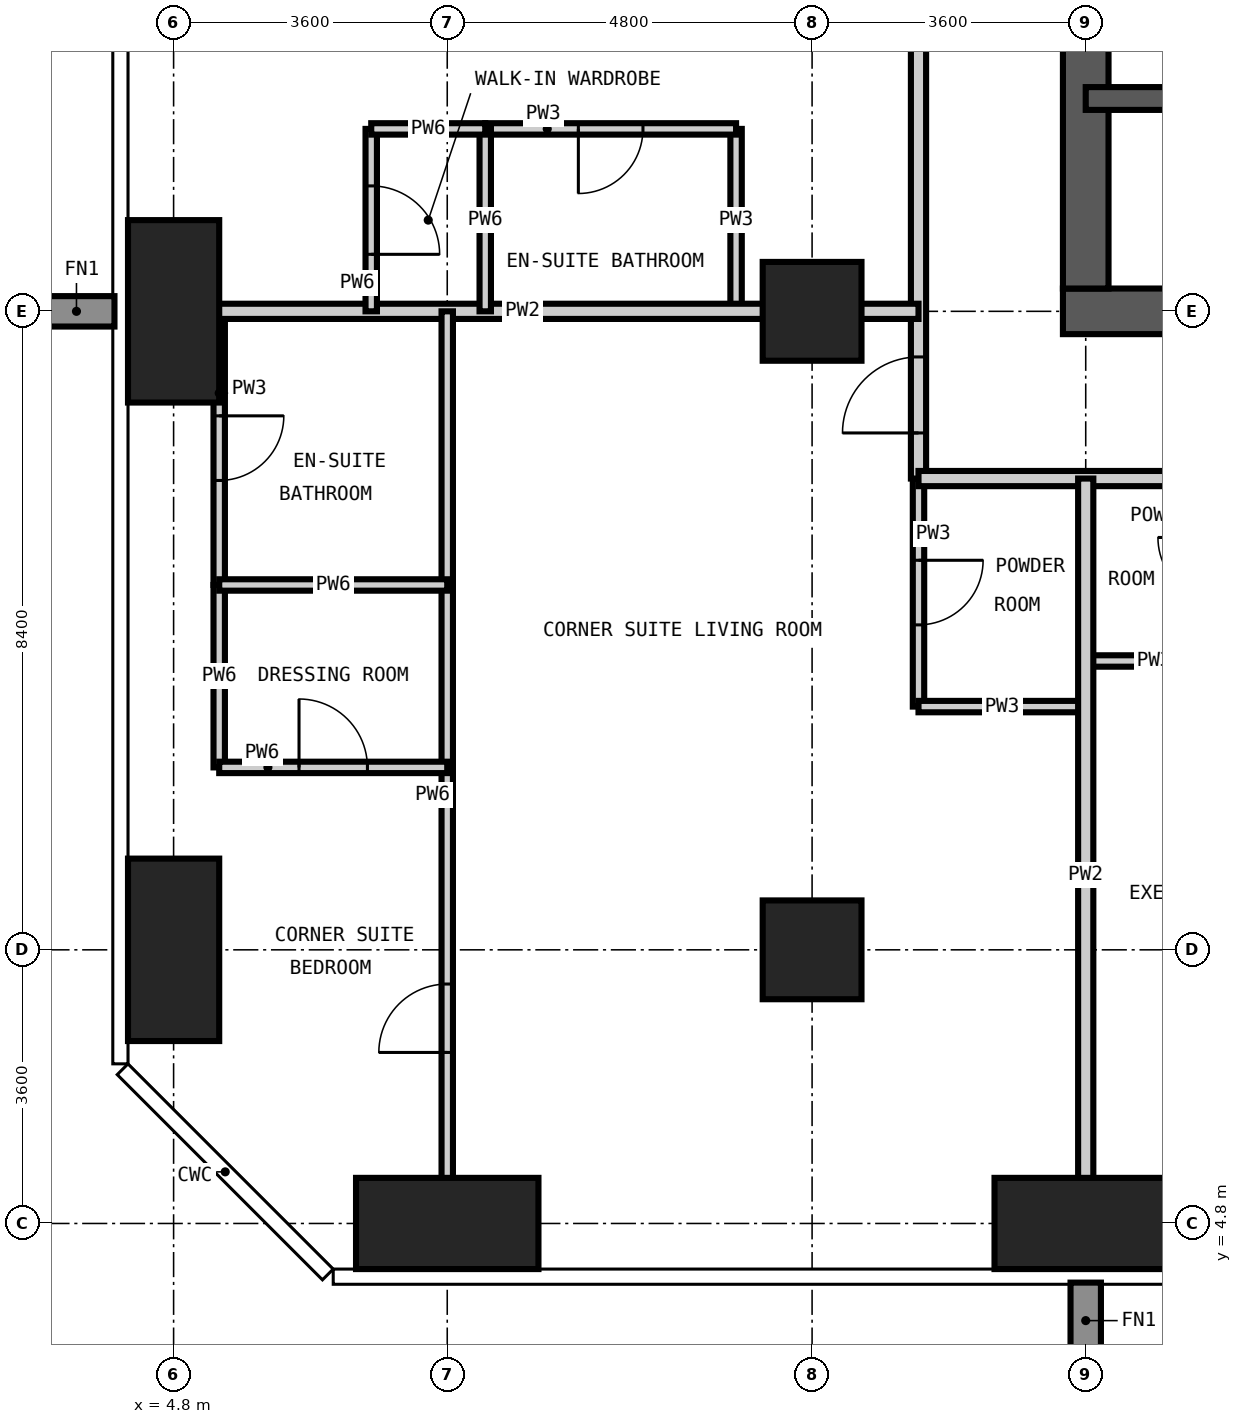
"""IFC4 building model, lengths in metres.
Left out: names, types, materials, properties, quantities, classifications, styles, units other than length and angle.
Written with IfcOpenShell. Run it as: python <this file> out.ifc"""

import sys

from ifc_helpers import new_model, si_unit, direction, frame, frame_2d, origin, origin_2d, place, context, subcontext, project, spatial, rectangle, extrude, element, fill, save


model = new_model("IFC4")
c1 = context("Model", 3, precision=1e-05, world=origin(), true_north=direction((0.0, 1.0)))
c2 = subcontext(c1, "Body", "Model", "MODEL_VIEW")
j1 = project(units=[si_unit("LENGTHUNIT", "METRE"), si_unit("PLANEANGLEUNIT", "RADIAN")], contexts=[c1])
p1 = place(None, origin())
s1 = spatial("IfcSite", under=j1, at=p1, CompositionType="ELEMENT")
p2 = place(p1, origin())
s2 = spatial("IfcBuilding", under=s1, at=p2, CompositionType="ELEMENT")
p3 = place(p2, frame((0.0, 0.0, 180.6)))
s3 = spatial("IfcBuildingStorey", under=s2, at=p3, CompositionType="ELEMENT", Elevation=180.6)
for number, where, z_axis, x_axis in (
    (1, (4.8, 8.4, -0.35), (0.0, 0.0, 1.0), (1.0, 0.0, 0.0)),
    (2, (4.8, 16.8, -0.35), (0.0, 0.0, 1.0), (1.0, 0.0, 0.0)),
):
    element("IfcColumn", number, at=place(p3, frame(where, z_axis=z_axis, x_axis=x_axis)), inside=s3, PredefinedType="COLUMN", context=c2, shape_type="SweptSolid", body=[
        extrude(rectangle(XDim=1.2, YDim=2.4, at=origin_2d()), origin(), (0.0, 0.0, 1.0), 3.6),
    ])
p4 = place(p3, frame((8.4, 4.8, -0.35), z_axis=(0.0, 0.0, 1.0), x_axis=(1.0, 0.0, 0.0)))
e3 = element("IfcColumn", 3, at=p4, inside=s3, PredefinedType="COLUMN", context=c2, shape_type="SweptSolid", body=[
    extrude(rectangle(XDim=2.4, YDim=1.2, at=origin_2d()), origin(), (0.0, 0.0, 1.0), 3.6),
])
for number, where, z_axis, x_axis in (
    (4, (13.2, 8.4, -0.35), (0.0, 0.0, 1.0), (1.0, 0.0, 0.0)),
    (5, (13.2, 16.8, -0.35), (0.0, 0.0, 1.0), (1.0, 0.0, 0.0)),
):
    element("IfcColumn", number, at=place(p3, frame(where, z_axis=z_axis, x_axis=x_axis)), inside=s3, PredefinedType="COLUMN", context=c2, shape_type="SweptSolid", body=[
        extrude(rectangle(XDim=1.3, YDim=1.3, at=origin_2d()), origin(), (0.0, 0.0, 1.0), 3.6),
    ])
p5 = place(p3, frame((16.8, 4.8, -0.35), z_axis=(0.0, 0.0, 1.0), x_axis=(1.0, 0.0, 0.0)))
e6 = element("IfcColumn", 6, at=p5, inside=s3, PredefinedType="COLUMN", context=c2, shape_type="SweptSolid", body=[
    extrude(rectangle(XDim=2.4, YDim=1.2, at=origin_2d()), origin(), (0.0, 0.0, 1.0), 3.6),
])
p6 = place(p3, frame((16.5, 16.8, -0.35), z_axis=(0.0, 0.0, 1.0), x_axis=(1.0, 0.0, 0.0)))
e7 = element("IfcWall", 7, at=p6, inside=s3, PredefinedType="SHEAR", context=c2, shape_type="SweptSolid", body=[
    extrude(rectangle(XDim=25.8, YDim=0.6, at=frame_2d((12.9, 0.0))), origin(), (0.0, 0.0, 1.0), 3.6),
])
p7 = place(p6, frame((12.4, 0.0, 0.35)))
e8 = element("IfcOpeningElement", 8, at=p7, cuts=e7, PredefinedType="OPENING", context=c2, shape_type="SweptSolid", body=[
    extrude(rectangle(XDim=1.0, YDim=2.1, at=frame_2d((0.5, 1.05))), frame((0.0, 0.31, 0.0), z_axis=(0.0, -1.0, 0.0), x_axis=(1.0, 0.0, 0.0)), (0.0, 0.0, 1.0), 0.62),
])
p8 = place(p6, frame((18.7, 0.0, 0.35)))
e9 = element("IfcOpeningElement", 9, at=p8, cuts=e7, PredefinedType="OPENING", context=c2, shape_type="SweptSolid", body=[
    extrude(rectangle(XDim=1.0, YDim=2.1, at=frame_2d((0.5, 1.05))), frame((0.0, 0.31, 0.0), z_axis=(0.0, -1.0, 0.0), x_axis=(1.0, 0.0, 0.0)), (0.0, 0.0, 1.0), 0.62),
])
p9 = place(p3, frame((16.8, 41.7, -0.35), z_axis=(0.0, 0.0, 1.0), x_axis=(0.0, -1.0, 0.0)))
e10 = element("IfcWall", 10, at=p9, inside=s3, PredefinedType="SHEAR", context=c2, shape_type="SweptSolid", body=[
    extrude(rectangle(XDim=24.6, YDim=0.6, at=frame_2d((12.3, 0.0))), origin(), (0.0, 0.0, 1.0), 3.6),
])
p10 = place(p9, frame((11.4, 0.0, 0.35)))
e11 = element("IfcOpeningElement", 11, at=p10, cuts=e10, PredefinedType="OPENING", context=c2, shape_type="SweptSolid", body=[
    extrude(rectangle(XDim=1.8, YDim=2.2, at=frame_2d((0.9, 1.1))), frame((0.0, 0.31, 0.0), z_axis=(0.0, -1.0, 0.0), x_axis=(1.0, 0.0, 0.0)), (0.0, 0.0, 1.0), 0.62),
])
p11 = place(p9, frame((20.2, 0.0, 0.35)))
e12 = element("IfcOpeningElement", 12, at=p11, cuts=e10, PredefinedType="OPENING", context=c2, shape_type="SweptSolid", body=[
    extrude(rectangle(XDim=1.0, YDim=2.1, at=frame_2d((0.5, 1.05))), frame((0.0, 0.31, 0.0), z_axis=(0.0, -1.0, 0.0), x_axis=(1.0, 0.0, 0.0)), (0.0, 0.0, 1.0), 0.62),
])
p12 = place(p9, frame((5.5, 0.0, 0.35)))
e13 = element("IfcOpeningElement", 13, at=p12, cuts=e10, PredefinedType="OPENING", context=c2, shape_type="SweptSolid", body=[
    extrude(rectangle(XDim=1.0, YDim=2.1, at=frame_2d((0.5, 1.05))), frame((0.0, 0.31, 0.0), z_axis=(0.0, -1.0, 0.0), x_axis=(1.0, 0.0, 0.0)), (0.0, 0.0, 1.0), 0.62),
])
p13 = place(p3, frame((16.8, 19.6, -0.35), z_axis=(0.0, 0.0, 1.0), x_axis=(1.0, 0.0, 0.0)))
e14 = element("IfcWall", 14, at=p13, inside=s3, PredefinedType="SHEAR", context=c2, shape_type="SweptSolid", body=[
    extrude(rectangle(XDim=8.4, YDim=0.3, at=frame_2d((4.2, 0.0))), origin(), (0.0, 0.0, 1.0), 3.6),
])
p14 = place(p13, frame((1.6, 0.0, 0.35)))
e15 = element("IfcOpeningElement", 15, at=p14, cuts=e14, PredefinedType="OPENING", context=c2, shape_type="SweptSolid", body=[
    extrude(rectangle(XDim=1.0, YDim=2.1, at=frame_2d((0.5, 1.05))), frame((0.0, 0.16, 0.0), z_axis=(0.0, -1.0, 0.0), x_axis=(1.0, 0.0, 0.0)), (0.0, 0.0, 1.0), 0.32),
])
p15 = place(p13, frame((5.8, 0.0, 0.35)))
e16 = element("IfcOpeningElement", 16, at=p15, cuts=e14, PredefinedType="OPENING", context=c2, shape_type="SweptSolid", body=[
    extrude(rectangle(XDim=1.0, YDim=2.1, at=frame_2d((0.5, 1.05))), frame((0.0, 0.16, 0.0), z_axis=(0.0, -1.0, 0.0), x_axis=(1.0, 0.0, 0.0)), (0.0, 0.0, 1.0), 0.32),
])
p16 = place(p3, frame((5.4, 13.2, 0.0), z_axis=(0.0, 0.0, 1.0), x_axis=(0.0, 1.0, 0.0)))
e17 = element("IfcWall", 17, at=p16, inside=s3, PredefinedType="PARTITIONING", context=c2, shape_type="SweptSolid", body=[
    extrude(rectangle(XDim=3.6, YDim=0.15, at=frame_2d((1.8, 0.0))), origin(), (0.0, 0.0, 1.0), 3.25),
])
p17 = place(p16, frame((1.375, 0.0, 0.0)))
e18 = element("IfcOpeningElement", 18, at=p17, cuts=e17, PredefinedType="OPENING", context=c2, shape_type="SweptSolid", body=[
    extrude(rectangle(XDim=0.85, YDim=2.1, at=frame_2d((0.425, 1.05))), frame((0.0, 0.085, 0.0), z_axis=(0.0, -1.0, 0.0), x_axis=(1.0, 0.0, 0.0)), (0.0, 0.0, 1.0), 0.17),
])
p18 = place(p3, frame((12.2, 16.8, 0.0), z_axis=(0.0, 0.0, 1.0), x_axis=(0.0, 1.0, 0.0)))
e19 = element("IfcWall", 19, at=p18, inside=s3, PredefinedType="PARTITIONING", context=c2, shape_type="SweptSolid", body=[
    extrude(rectangle(XDim=2.4, YDim=0.15, at=frame_2d((1.2, 0.0))), origin(), (0.0, 0.0, 1.0), 3.25),
])
p19 = place(p3, frame((14.6, 11.6, 0.0), z_axis=(0.0, 0.0, 1.0), x_axis=(0.0, 1.0, 0.0)))
e20 = element("IfcWall", 20, at=p19, inside=s3, PredefinedType="PARTITIONING", context=c2, shape_type="SweptSolid", body=[
    extrude(rectangle(XDim=3.0, YDim=0.15, at=frame_2d((1.5, 0.0))), origin(), (0.0, 0.0, 1.0), 3.25),
])
p20 = place(p19, frame((1.075, 0.0, 0.0)))
e21 = element("IfcOpeningElement", 21, at=p20, cuts=e20, PredefinedType="OPENING", context=c2, shape_type="SweptSolid", body=[
    extrude(rectangle(XDim=0.85, YDim=2.1, at=frame_2d((0.425, 1.05))), frame((0.0, 0.085, 0.0), z_axis=(0.0, -1.0, 0.0), x_axis=(1.0, 0.0, 0.0)), (0.0, 0.0, 1.0), 0.17),
])
p21 = place(p3, frame((14.6, 11.6, 0.0), z_axis=(0.0, 0.0, 1.0), x_axis=(1.0, 0.0, 0.0)))
e22 = element("IfcWall", 22, at=p21, inside=s3, PredefinedType="PARTITIONING", context=c2, shape_type="SweptSolid", body=[
    extrude(rectangle(XDim=2.2, YDim=0.15, at=frame_2d((1.1, 0.0))), origin(), (0.0, 0.0, 1.0), 3.25),
])
p22 = place(p3, frame((16.8, 12.2, 0.0), z_axis=(0.0, 0.0, 1.0), x_axis=(1.0, 0.0, 0.0)))
e23 = element("IfcWall", 23, at=p22, inside=s3, PredefinedType="PARTITIONING", context=c2, shape_type="SweptSolid", body=[
    extrude(rectangle(XDim=1.8, YDim=0.15, at=frame_2d((0.9, 0.0))), origin(), (0.0, 0.0, 1.0), 3.25),
])
p23 = place(p3, frame((8.9, 19.2, 0.0), z_axis=(0.0, 0.0, 1.0), x_axis=(1.0, 0.0, 0.0)))
e24 = element("IfcWall", 24, at=p23, inside=s3, PredefinedType="PARTITIONING", context=c2, shape_type="SweptSolid", body=[
    extrude(rectangle(XDim=3.3, YDim=0.15, at=frame_2d((1.65, 0.0))), origin(), (0.0, 0.0, 1.0), 3.25),
])
p24 = place(p23, frame((1.225, 0.0, 0.0)))
e25 = element("IfcOpeningElement", 25, at=p24, cuts=e24, PredefinedType="OPENING", context=c2, shape_type="SweptSolid", body=[
    extrude(rectangle(XDim=0.85, YDim=2.1, at=frame_2d((0.425, 1.05))), frame((0.0, 0.085, 0.0), z_axis=(0.0, -1.0, 0.0), x_axis=(1.0, 0.0, 0.0)), (0.0, 0.0, 1.0), 0.17),
])
p25 = place(p3, frame((14.6, 14.6, 0.0), z_axis=(0.0, 0.0, 1.0), x_axis=(0.0, 1.0, 0.0)))
e26 = element("IfcWall", 26, at=p25, inside=s3, PredefinedType="PARTITIONING", context=c2, shape_type="SweptSolid", body=[
    extrude(rectangle(XDim=30.8, YDim=0.2, at=frame_2d((15.4, 0.0))), origin(), (0.0, 0.0, 1.0), 3.25),
])
p26 = place(p25, frame((5.9, 0.0, 0.0)))
e27 = element("IfcOpeningElement", 27, at=p26, cuts=e26, PredefinedType="OPENING", context=c2, shape_type="SweptSolid", body=[
    extrude(rectangle(XDim=1.0, YDim=2.2, at=frame_2d((0.5, 1.1))), frame((0.0, 0.11, 0.0), z_axis=(0.0, -1.0, 0.0), x_axis=(1.0, 0.0, 0.0)), (0.0, 0.0, 1.0), 0.22),
])
p27 = place(p25, frame((11.8, 0.0, 0.0)))
e28 = element("IfcOpeningElement", 28, at=p27, cuts=e26, PredefinedType="OPENING", context=c2, shape_type="SweptSolid", body=[
    extrude(rectangle(XDim=1.8, YDim=2.4, at=frame_2d((0.9, 1.2))), frame((0.0, 0.11, 0.0), z_axis=(0.0, -1.0, 0.0), x_axis=(1.0, 0.0, 0.0)), (0.0, 0.0, 1.0), 0.22),
])
p28 = place(p25, frame((19.425, 0.0, 0.0)))
e29 = element("IfcOpeningElement", 29, at=p28, cuts=e26, PredefinedType="OPENING", context=c2, shape_type="SweptSolid", body=[
    extrude(rectangle(XDim=1.0, YDim=2.2, at=frame_2d((0.5, 1.1))), frame((0.0, 0.11, 0.0), z_axis=(0.0, -1.0, 0.0), x_axis=(1.0, 0.0, 0.0)), (0.0, 0.0, 1.0), 0.22),
])
p29 = place(p25, frame((24.8, 0.0, 0.0)))
e30 = element("IfcOpeningElement", 30, at=p29, cuts=e26, PredefinedType="OPENING", context=c2, shape_type="SweptSolid", body=[
    extrude(rectangle(XDim=1.0, YDim=2.2, at=frame_2d((0.5, 1.1))), frame((0.0, 0.11, 0.0), z_axis=(0.0, -1.0, 0.0), x_axis=(1.0, 0.0, 0.0)), (0.0, 0.0, 1.0), 0.22),
])
p30 = place(p25, frame((0.6, 0.0, 0.0)))
e31 = element("IfcOpeningElement", 31, at=p30, cuts=e26, PredefinedType="OPENING", context=c2, shape_type="SweptSolid", body=[
    extrude(rectangle(XDim=1.0, YDim=2.2, at=frame_2d((0.5, 1.1))), frame((0.0, 0.11, 0.0), z_axis=(0.0, -1.0, 0.0), x_axis=(1.0, 0.0, 0.0)), (0.0, 0.0, 1.0), 0.22),
])
p31 = place(p25, frame((28.6, 0.0, 0.0)))
e32 = element("IfcOpeningElement", 32, at=p31, cuts=e26, PredefinedType="OPENING", context=c2, shape_type="SweptSolid", body=[
    extrude(rectangle(XDim=1.0, YDim=2.2, at=frame_2d((0.5, 1.1))), frame((0.0, 0.11, 0.0), z_axis=(0.0, -1.0, 0.0), x_axis=(1.0, 0.0, 0.0)), (0.0, 0.0, 1.0), 0.22),
])
p32 = place(p3, frame((44.8, 14.6, 0.0), z_axis=(0.0, 0.0, 1.0), x_axis=(-1.0, 0.0, 0.0)))
e33 = element("IfcWall", 33, at=p32, inside=s3, PredefinedType="PARTITIONING", context=c2, shape_type="SweptSolid", body=[
    extrude(rectangle(XDim=30.2, YDim=0.2, at=frame_2d((15.1, 0.0))), origin(), (0.0, 0.0, 1.0), 3.25),
])
p33 = place(p32, frame((24.5, 0.0, 0.0)))
e34 = element("IfcOpeningElement", 34, at=p33, cuts=e33, PredefinedType="OPENING", context=c2, shape_type="SweptSolid", body=[
    extrude(rectangle(XDim=1.0, YDim=2.2, at=frame_2d((0.5, 1.1))), frame((0.0, 0.11, 0.0), z_axis=(0.0, -1.0, 0.0), x_axis=(1.0, 0.0, 0.0)), (0.0, 0.0, 1.0), 0.22),
])
p34 = place(p32, frame((13.7, 0.0, 0.0)))
e35 = element("IfcOpeningElement", 35, at=p34, cuts=e33, PredefinedType="OPENING", context=c2, shape_type="SweptSolid", body=[
    extrude(rectangle(XDim=1.0, YDim=2.2, at=frame_2d((0.5, 1.1))), frame((0.0, 0.11, 0.0), z_axis=(0.0, -1.0, 0.0), x_axis=(1.0, 0.0, 0.0)), (0.0, 0.0, 1.0), 0.22),
])
p35 = place(p32, frame((7.7, 0.0, 0.0)))
e36 = element("IfcOpeningElement", 36, at=p35, cuts=e33, PredefinedType="OPENING", context=c2, shape_type="SweptSolid", body=[
    extrude(rectangle(XDim=1.0, YDim=2.2, at=frame_2d((0.5, 1.1))), frame((0.0, 0.11, 0.0), z_axis=(0.0, -1.0, 0.0), x_axis=(1.0, 0.0, 0.0)), (0.0, 0.0, 1.0), 0.22),
])
for number, where, z_axis, x_axis in (
    (37, (16.8, 4.182, 0.0), (0.0, 0.0, 1.0), (0.0, 1.0, 0.0)),
    (38, (4.182, 16.8, 0.0), (0.0, 0.0, 1.0), (1.0, 0.0, 0.0)),
):
    element("IfcWall", number, at=place(p3, frame(where, z_axis=z_axis, x_axis=x_axis)), inside=s3, PredefinedType="PARTITIONING", context=c2, shape_type="SweptSolid", body=[
        extrude(rectangle(XDim=10.418, YDim=0.2, at=frame_2d((5.209, 0.0))), origin(), (0.0, 0.0, 1.0), 3.25),
    ])
p36 = place(p3, frame((5.4, 10.8, 0.0), z_axis=(0.0, 0.0, 1.0), x_axis=(0.0, 1.0, 0.0)))
e39 = element("IfcWall", 39, at=p36, inside=s3, PredefinedType="PARTITIONING", context=c2, shape_type="SweptSolid", body=[
    extrude(rectangle(XDim=2.4, YDim=0.15, at=frame_2d((1.2, 0.0))), origin(), (0.0, 0.0, 1.0), 3.25),
])
p37 = place(p3, frame((7.4, 16.8, 0.0), z_axis=(0.0, 0.0, 1.0), x_axis=(0.0, 1.0, 0.0)))
e40 = element("IfcWall", 40, at=p37, inside=s3, PredefinedType="PARTITIONING", context=c2, shape_type="SweptSolid", body=[
    extrude(rectangle(XDim=2.4, YDim=0.15, at=frame_2d((1.2, 0.0))), origin(), (0.0, 0.0, 1.0), 3.25),
])
p38 = place(p37, frame((0.75, 0.0, 0.0)))
e41 = element("IfcOpeningElement", 41, at=p38, cuts=e40, PredefinedType="OPENING", context=c2, shape_type="SweptSolid", body=[
    extrude(rectangle(XDim=0.9, YDim=2.1, at=frame_2d((0.45, 1.05))), frame((0.0, 0.085, 0.0), z_axis=(0.0, -1.0, 0.0), x_axis=(1.0, 0.0, 0.0)), (0.0, 0.0, 1.0), 0.17),
])
p39 = place(p3, frame((8.4, 4.182, 0.0), z_axis=(0.0, 0.0, 1.0), x_axis=(0.0, 1.0, 0.0)))
e42 = element("IfcWall", 42, at=p39, inside=s3, PredefinedType="PARTITIONING", context=c2, shape_type="SweptSolid", body=[
    extrude(rectangle(XDim=12.618, YDim=0.15, at=frame_2d((6.309, 0.0))), origin(), (0.0, 0.0, 1.0), 3.25),
])
p40 = place(p39, frame((2.868, 0.0, 0.0)))
e43 = element("IfcOpeningElement", 43, at=p40, cuts=e42, PredefinedType="OPENING", context=c2, shape_type="SweptSolid", body=[
    extrude(rectangle(XDim=0.9, YDim=2.1, at=frame_2d((0.45, 1.05))), frame((0.0, 0.085, 0.0), z_axis=(0.0, -1.0, 0.0), x_axis=(1.0, 0.0, 0.0)), (0.0, 0.0, 1.0), 0.17),
])
p41 = place(p3, frame((8.9, 16.8, 0.0), z_axis=(0.0, 0.0, 1.0), x_axis=(0.0, 1.0, 0.0)))
e44 = element("IfcWall", 44, at=p41, inside=s3, PredefinedType="PARTITIONING", context=c2, shape_type="SweptSolid", body=[
    extrude(rectangle(XDim=2.4, YDim=0.15, at=frame_2d((1.2, 0.0))), origin(), (0.0, 0.0, 1.0), 3.25),
])
p42 = place(p3, frame((5.4, 10.8, 0.0), z_axis=(0.0, 0.0, 1.0), x_axis=(1.0, 0.0, 0.0)))
e45 = element("IfcWall", 45, at=p42, inside=s3, PredefinedType="PARTITIONING", context=c2, shape_type="SweptSolid", body=[
    extrude(rectangle(XDim=3.0, YDim=0.15, at=frame_2d((1.5, 0.0))), origin(), (0.0, 0.0, 1.0), 3.25),
])
p43 = place(p42, frame((1.05, 0.0, 0.0)))
e46 = element("IfcOpeningElement", 46, at=p43, cuts=e45, PredefinedType="OPENING", context=c2, shape_type="SweptSolid", body=[
    extrude(rectangle(XDim=0.9, YDim=2.1, at=frame_2d((0.45, 1.05))), frame((0.0, 0.085, 0.0), z_axis=(0.0, -1.0, 0.0), x_axis=(1.0, 0.0, 0.0)), (0.0, 0.0, 1.0), 0.17),
])
p44 = place(p3, frame((5.4, 13.2, 0.0), z_axis=(0.0, 0.0, 1.0), x_axis=(1.0, 0.0, 0.0)))
e47 = element("IfcWall", 47, at=p44, inside=s3, PredefinedType="PARTITIONING", context=c2, shape_type="SweptSolid", body=[
    extrude(rectangle(XDim=3.0, YDim=0.15, at=frame_2d((1.5, 0.0))), origin(), (0.0, 0.0, 1.0), 3.25),
])
p45 = place(p3, frame((7.4, 19.2, 0.0), z_axis=(0.0, 0.0, 1.0), x_axis=(1.0, 0.0, 0.0)))
e48 = element("IfcWall", 48, at=p45, inside=s3, PredefinedType="PARTITIONING", context=c2, shape_type="SweptSolid", body=[
    extrude(rectangle(XDim=1.5, YDim=0.15, at=frame_2d((0.75, 0.0))), origin(), (0.0, 0.0, 1.0), 3.25),
])
p46 = place(p24, frame((0.85, 0.0, 0.0), z_axis=(0.0, 0.0, 1.0), x_axis=(-1.0, 0.0, 0.0)))
e49 = element("IfcDoor", 49, at=p46, inside=s3, OperationType="SINGLE_SWING_RIGHT", PredefinedType="DOOR", context=c2, shape_type="SweptSolid", body=[
    extrude(rectangle(XDim=0.85, YDim=2.1, at=frame_2d((0.425, 1.05))), frame((0.0, 0.025, 0.0), z_axis=(0.0, -1.0, 0.0), x_axis=(1.0, 0.0, 0.0)), (0.0, 0.0, 1.0), 0.05),
])
fill(e25, e49)
p47 = place(p38, frame((0.9, 0.0, 0.0), z_axis=(0.0, 0.0, 1.0), x_axis=(-1.0, 0.0, 0.0)))
e50 = element("IfcDoor", 50, at=p47, inside=s3, OperationType="SINGLE_SWING_RIGHT", PredefinedType="DOOR", context=c2, shape_type="SweptSolid", body=[
    extrude(rectangle(XDim=0.9, YDim=2.1, at=frame_2d((0.45, 1.05))), frame((0.0, 0.025, 0.0), z_axis=(0.0, -1.0, 0.0), x_axis=(1.0, 0.0, 0.0)), (0.0, 0.0, 1.0), 0.05),
])
fill(e41, e50)
p48 = place(p30, origin())
e51 = element("IfcDoor", 51, at=p48, inside=s3, OperationType="SINGLE_SWING_LEFT", PredefinedType="DOOR", context=c2, shape_type="SweptSolid", body=[
    extrude(rectangle(XDim=1.0, YDim=2.2, at=frame_2d((0.5, 1.1))), frame((0.0, 0.025, 0.0), z_axis=(0.0, -1.0, 0.0), x_axis=(1.0, 0.0, 0.0)), (0.0, 0.0, 1.0), 0.05),
])
fill(e31, e51)
p49 = place(p20, frame((0.85, 0.0, 0.0), z_axis=(0.0, 0.0, 1.0), x_axis=(-1.0, 0.0, 0.0)))
e52 = element("IfcDoor", 52, at=p49, inside=s3, OperationType="SINGLE_SWING_LEFT", PredefinedType="DOOR", context=c2, shape_type="SweptSolid", body=[
    extrude(rectangle(XDim=0.85, YDim=2.1, at=frame_2d((0.425, 1.05))), frame((0.0, 0.025, 0.0), z_axis=(0.0, -1.0, 0.0), x_axis=(1.0, 0.0, 0.0)), (0.0, 0.0, 1.0), 0.05),
])
fill(e21, e52)
p50 = place(p40, origin())
e53 = element("IfcDoor", 53, at=p50, inside=s3, OperationType="SINGLE_SWING_LEFT", PredefinedType="DOOR", context=c2, shape_type="SweptSolid", body=[
    extrude(rectangle(XDim=0.9, YDim=2.1, at=frame_2d((0.45, 1.05))), frame((0.0, 0.025, 0.0), z_axis=(0.0, -1.0, 0.0), x_axis=(1.0, 0.0, 0.0)), (0.0, 0.0, 1.0), 0.05),
])
fill(e43, e53)
p51 = place(p17, frame((0.85, 0.0, 0.0), z_axis=(0.0, 0.0, 1.0), x_axis=(-1.0, 0.0, 0.0)))
e54 = element("IfcDoor", 54, at=p51, inside=s3, OperationType="SINGLE_SWING_LEFT", PredefinedType="DOOR", context=c2, shape_type="SweptSolid", body=[
    extrude(rectangle(XDim=0.85, YDim=2.1, at=frame_2d((0.425, 1.05))), frame((0.0, 0.025, 0.0), z_axis=(0.0, -1.0, 0.0), x_axis=(1.0, 0.0, 0.0)), (0.0, 0.0, 1.0), 0.05),
])
fill(e18, e54)
p52 = place(p43, origin())
e55 = element("IfcDoor", 55, at=p52, inside=s3, OperationType="SINGLE_SWING_LEFT", PredefinedType="DOOR", context=c2, shape_type="SweptSolid", body=[
    extrude(rectangle(XDim=0.9, YDim=2.1, at=frame_2d((0.45, 1.05))), frame((0.0, 0.025, 0.0), z_axis=(0.0, -1.0, 0.0), x_axis=(1.0, 0.0, 0.0)), (0.0, 0.0, 1.0), 0.05),
])
fill(e46, e55)
save(model, sys.argv[1])
